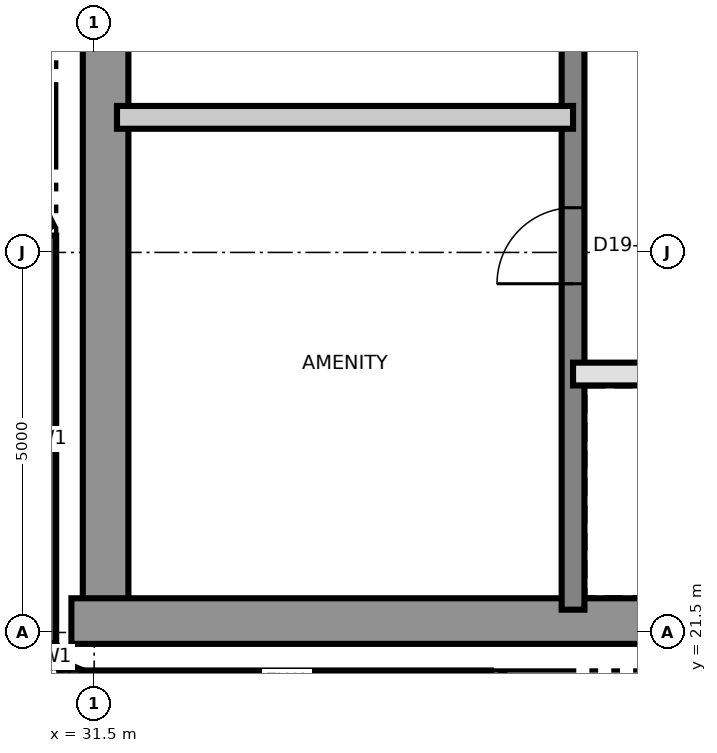
"""IFC4 building model, lengths in metres.
Left out: names, types, materials, properties, quantities, classifications, styles, units other than length and angle.
Written with IfcOpenShell. Run it as: python <this file> out.ifc"""

import sys

from ifc_helpers import new_model, si_unit, direction, frame, frame_2d, origin, place, context, subcontext, project, spatial, rectangle, extrude, element, fill, save


model = new_model("IFC4")
c1 = context("Model", 3, precision=1e-05, world=origin(), true_north=direction((0.0, 1.0)))
c2 = subcontext(c1, "Body", "Model", "MODEL_VIEW")
j1 = project(units=[si_unit("LENGTHUNIT", "METRE"), si_unit("PLANEANGLEUNIT", "RADIAN")], contexts=[c1])
p1 = place(None, origin())
s1 = spatial("IfcSite", under=j1, at=p1, CompositionType="ELEMENT")
p2 = place(p1, origin())
s2 = spatial("IfcBuilding", under=s1, at=p2, CompositionType="ELEMENT")
p3 = place(p2, frame((0.0, 0.0, 179.2)))
s3 = spatial("IfcBuildingStorey", under=s2, at=p3, CompositionType="ELEMENT", Elevation=179.2)
p4 = place(p3, frame((31.65, 21.8, 0.0), z_axis=(0.0, 0.0, 1.0), x_axis=(0.0, 1.0, 0.0)))
e1 = element("IfcWall", 1, at=p4, inside=s3, PredefinedType="SHEAR", context=c2, shape_type="SweptSolid", body=[
    extrude(rectangle(XDim=17.4, YDim=0.6, at=frame_2d((8.7, 0.0))), origin(), (0.0, 0.0, 1.0), 3.7),
])
p5 = place(p3, frame((31.2, 21.65, 0.0), z_axis=(0.0, 0.0, 1.0), x_axis=(1.0, 0.0, 0.0)))
e2 = element("IfcWall", 2, at=p5, inside=s3, PredefinedType="SHEAR", context=c2, shape_type="SweptSolid", body=[
    extrude(rectangle(XDim=27.0, YDim=0.6, at=frame_2d((13.5, 0.0))), origin(), (0.0, 0.0, 1.0), 3.7),
])
p6 = place(p3, frame((37.8, 21.8, 0.0), z_axis=(0.0, 0.0, 1.0), x_axis=(0.0, 1.0, 0.0)))
e3 = element("IfcWall", 3, at=p6, inside=s3, PredefinedType="SHEAR", context=c2, shape_type="SweptSolid", body=[
    extrude(rectangle(XDim=8.7, YDim=0.3, at=frame_2d((4.35, 0.0))), origin(), (0.0, 0.0, 1.0), 3.7),
])
p7 = place(p6, frame((4.288, 0.0, 0.0)))
e4 = element("IfcOpeningElement", 4, at=p7, cuts=e3, PredefinedType="OPENING", context=c2, shape_type="SweptSolid", body=[
    extrude(rectangle(XDim=1.0, YDim=2.1, at=frame_2d((0.5, 1.05))), frame((0.0, 0.16, 0.0), z_axis=(0.0, -1.0, 0.0), x_axis=(1.0, 0.0, 0.0)), (0.0, 0.0, 1.0), 0.32),
])
p8 = place(p3, frame((30.85, 26.722, 0.0), z_axis=(0.0, 0.0, 1.0), x_axis=(0.0, -1.0, 0.0)))
e5 = element("IfcWall", 5, at=p8, inside=s3, PredefinedType="SOLIDWALL", context=c2, shape_type="SweptSolid", body=[
    extrude(rectangle(XDim=5.362, YDim=0.3, at=frame_2d((2.681, 0.0))), origin(), (0.0, 0.0, 1.0), 3.4),
])
for number, where, z_axis, x_axis in (
    (6, (30.861, 21.302, 0.0), (0.0, 0.0, 1.0), (0.383, -0.924, 0.0)),
    (7, (31.048, 20.967, 0.0), (0.0, 0.0, 1.0), (0.924, -0.383, 0.0)),
):
    element("IfcWall", number, at=place(p3, frame(where, z_axis=z_axis, x_axis=x_axis)), inside=s3, PredefinedType="SOLIDWALL", context=c2, shape_type="SweptSolid", body=[
        extrude(rectangle(XDim=0.275, YDim=0.3, at=frame_2d((0.138, 0.0))), origin(), (0.0, 0.0, 1.0), 3.4),
    ])
p9 = place(p3, frame((31.36, 20.85, 0.0), z_axis=(0.0, 0.0, 1.0), x_axis=(1.0, 0.0, 0.0)))
e8 = element("IfcWall", 8, at=p9, inside=s3, PredefinedType="SOLIDWALL", context=c2, shape_type="SweptSolid", body=[
    extrude(rectangle(XDim=5.362, YDim=0.3, at=frame_2d((2.681, 0.0))), origin(), (0.0, 0.0, 1.0), 3.4),
])
for number, where, z_axis, x_axis in (
    (9, (36.788, 20.834, 0.0), (0.0, 0.0, 1.0), (0.897, -0.442, 0.0)),
    (10, (30.119, 28.24, 0.0), (0.0, 0.0, 1.0), (0.442, -0.897, 0.0)),
):
    element("IfcWall", number, at=place(p3, frame(where, z_axis=z_axis, x_axis=x_axis)), inside=s3, PredefinedType="SOLIDWALL", context=c2, shape_type="SweptSolid", body=[
        extrude(rectangle(XDim=1.618, YDim=0.3, at=frame_2d((0.809, 0.0))), origin(), (0.0, 0.0, 1.0), 3.4),
    ])
p10 = place(p3, frame((37.8, 24.9, 0.0), z_axis=(0.0, 0.0, 1.0), x_axis=(1.0, 0.0, 0.0)))
e11 = element("IfcWall", 11, at=p10, inside=s3, PredefinedType="SOLIDWALL", context=c2, shape_type="SweptSolid", body=[
    extrude(rectangle(XDim=12.0, YDim=0.3, at=frame_2d((6.0, 0.0))), origin(), (0.0, 0.0, 1.0), 3.4),
])
p11 = place(p10, frame((1.05, 0.0, 0.0)))
e12 = element("IfcOpeningElement", 12, at=p11, cuts=e11, PredefinedType="OPENING", context=c2, shape_type="SweptSolid", body=[
    extrude(rectangle(XDim=0.9, YDim=2.1, at=frame_2d((0.45, 1.05))), frame((0.0, 0.16, 0.0), z_axis=(0.0, -1.0, 0.0), x_axis=(1.0, 0.0, 0.0)), (0.0, 0.0, 1.0), 0.32),
])
p12 = place(p10, frame((10.05, 0.0, 0.0)))
e13 = element("IfcOpeningElement", 13, at=p12, cuts=e11, PredefinedType="OPENING", context=c2, shape_type="SweptSolid", body=[
    extrude(rectangle(XDim=0.9, YDim=2.1, at=frame_2d((0.45, 1.05))), frame((0.0, 0.16, 0.0), z_axis=(0.0, -1.0, 0.0), x_axis=(1.0, 0.0, 0.0)), (0.0, 0.0, 1.0), 0.32),
])
p13 = place(p10, frame((3.95, 0.0, 0.0)))
e14 = element("IfcOpeningElement", 14, at=p13, cuts=e11, PredefinedType="OPENING", context=c2, shape_type="SweptSolid", body=[
    extrude(rectangle(XDim=1.1, YDim=2.4, at=frame_2d((0.55, 1.2))), frame((0.0, 0.16, 0.0), z_axis=(0.0, -1.0, 0.0), x_axis=(1.0, 0.0, 0.0)), (0.0, 0.0, 1.0), 0.32),
])
p14 = place(p10, frame((6.95, 0.0, 0.0)))
e15 = element("IfcOpeningElement", 15, at=p14, cuts=e11, PredefinedType="OPENING", context=c2, shape_type="SweptSolid", body=[
    extrude(rectangle(XDim=1.1, YDim=2.4, at=frame_2d((0.55, 1.2))), frame((0.0, 0.16, 0.0), z_axis=(0.0, -1.0, 0.0), x_axis=(1.0, 0.0, 0.0)), (0.0, 0.0, 1.0), 0.32),
])
p15 = place(p3, frame((31.8, 28.277, 0.0), z_axis=(0.0, 0.0, 1.0), x_axis=(1.0, 0.0, 0.0)))
e16 = element("IfcWall", 16, at=p15, inside=s3, PredefinedType="PARTITIONING", context=c2, shape_type="SweptSolid", body=[
    extrude(rectangle(XDim=6.0, YDim=0.3, at=frame_2d((3.0, 0.0))), origin(), (0.0, 0.0, 1.0), 3.4),
])
p16 = place(p7, origin())
e17 = element("IfcDoor", 17, at=p16, inside=s3, OperationType="SINGLE_SWING_RIGHT", PredefinedType="DOOR", context=c2, shape_type="SweptSolid", body=[
    extrude(rectangle(XDim=1.0, YDim=2.1, at=frame_2d((0.5, 1.05))), frame((0.0, 0.025, 0.0), z_axis=(0.0, -1.0, 0.0), x_axis=(1.0, 0.0, 0.0)), (0.0, 0.0, 1.0), 0.05),
])
fill(e4, e17)
save(model, sys.argv[1])
